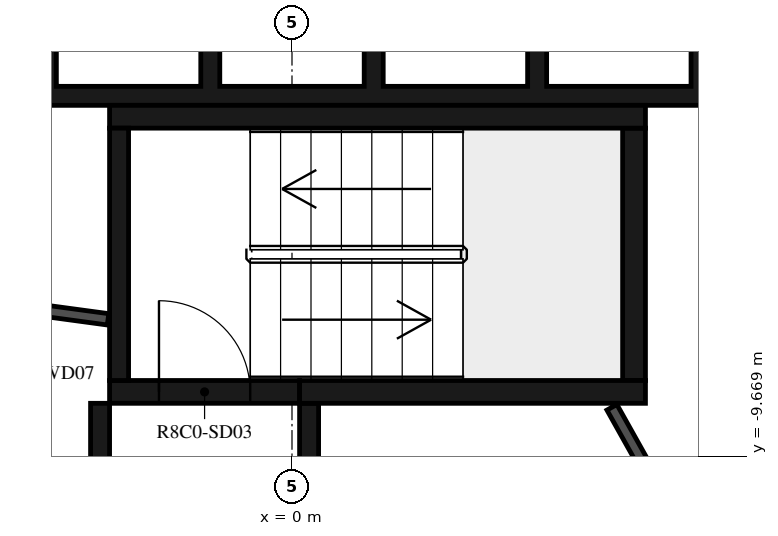
"""IFC4 building model, lengths in metres.
Left out: names, types, materials, properties, quantities, classifications, styles, units other than length and angle.
Written with IfcOpenShell. Run it as: python <this file> out.ifc"""

import sys

from ifc_helpers import new_model, si_unit, direction, frame, frame_2d, origin, place, context, subcontext, project, spatial, polyline, rectangle, outline, extrude, element, fill, save


model = new_model("IFC4")
c1 = context("Model", 3, precision=1e-05, world=origin(), true_north=direction((0.0, 1.0)))
c2 = subcontext(c1, "Body", "Model", "MODEL_VIEW")
j1 = project(units=[si_unit("LENGTHUNIT", "METRE"), si_unit("PLANEANGLEUNIT", "RADIAN")], contexts=[c1])
p1 = place(None, origin())
s1 = spatial("IfcSite", under=j1, at=p1, CompositionType="ELEMENT")
p2 = place(p1, origin())
s2 = spatial("IfcBuilding", under=s1, at=p2, CompositionType="ELEMENT")
p3 = place(p2, frame((0.0, 0.0, 319.2)))
s3 = spatial("IfcBuildingStorey", under=s2, at=p3, CompositionType="ELEMENT", Elevation=319.2)
p4 = place(p3, frame((4.51, -10.845, 0.0), z_axis=(0.0, 0.0, 1.0), x_axis=(0.865975092491, 0.500087131594, 0.0)))
e1 = element("IfcWall", 1, at=p4, inside=s3, PredefinedType="SHEAR", context=c2, shape_type="SweptSolid", body=[
    extrude(rectangle(XDim=3.033, YDim=0.5, at=frame_2d((1.516, 0.0))), origin(), (0.0, 0.0, 1.0), 3.12),
])
p5 = place(p3, frame((-2.275, -8.67, 0.0), z_axis=(0.0, 0.0, 1.0), x_axis=(0.0, 1.0, 0.0)))
e2 = element("IfcWall", 2, at=p5, inside=s3, PredefinedType="SHEAR", context=c2, shape_type="SweptSolid", body=[
    extrude(rectangle(XDim=3.32, YDim=0.25, at=frame_2d((1.66, 0.0))), origin(), (0.0, 0.0, 1.0), 3.12),
])
p6 = place(p3, frame((-2.4, -5.2, 0.0), z_axis=(0.0, 0.0, 1.0), x_axis=(1.0, 0.0, 0.0)))
e3 = element("IfcWall", 3, at=p6, inside=s3, PredefinedType="SHEAR", context=c2, shape_type="SweptSolid", body=[
    extrude(rectangle(XDim=7.05, YDim=0.3, at=frame_2d((3.525, 0.0))), origin(), (0.0, 0.0, 1.0), 3.12),
])
p7 = place(p3, frame((4.5, -8.67, 0.0), z_axis=(0.0, 0.0, 1.0), x_axis=(0.0, 1.0, 0.0)))
e4 = element("IfcWall", 4, at=p7, inside=s3, PredefinedType="SHEAR", context=c2, shape_type="SweptSolid", body=[
    extrude(rectangle(XDim=3.32, YDim=0.3, at=frame_2d((1.66, 0.0))), origin(), (0.0, 0.0, 1.0), 3.12),
])
p8 = place(p3, frame((0.1, -8.82, 0.0), z_axis=(0.0, 0.0, 1.0), x_axis=(1.0, 0.0, 0.0)))
e5 = element("IfcWall", 5, at=p8, inside=s3, PredefinedType="SHEAR", context=c2, shape_type="SweptSolid", body=[
    extrude(rectangle(XDim=4.55, YDim=0.3, at=frame_2d((2.275, 0.0))), origin(), (0.0, 0.0, 1.0), 3.12),
])
p9 = place(p3, frame((-2.4, -8.82, 0.0), z_axis=(0.0, 0.0, 1.0), x_axis=(1.0, 0.0, 0.0)))
e6 = element("IfcWall", 6, at=p9, inside=s3, PredefinedType="SHEAR", context=c2, shape_type="SweptSolid", body=[
    extrude(rectangle(XDim=2.5, YDim=0.3, at=frame_2d((1.25, 0.0))), origin(), (0.0, 0.0, 1.0), 3.12),
])
p10 = place(p9, frame((0.65, 0.0, 0.0)))
e7 = element("IfcOpeningElement", 7, at=p10, cuts=e6, PredefinedType="OPENING", context=c2, shape_type="SweptSolid", body=[
    extrude(rectangle(XDim=1.2, YDim=2.1, at=frame_2d((0.6, 1.05))), frame((0.0, 0.16, 0.0), z_axis=(0.0, -1.0, 0.0), x_axis=(1.0, 0.0, 0.0)), (0.0, 0.0, 1.0), 0.32),
])
p11 = place(p3, frame((-2.525, -8.97, 0.0), z_axis=(0.0, 0.0, 1.0), x_axis=(0.0, -1.0, 0.0)))
e8 = element("IfcWall", 8, at=p11, inside=s3, PredefinedType="SHEAR", context=c2, shape_type="SweptSolid", body=[
    extrude(rectangle(XDim=2.11, YDim=0.25, at=frame_2d((1.055, 0.0))), origin(), (0.0, 0.0, 1.0), 3.12),
])
p12 = place(p3, frame((0.225, -8.97, 0.0), z_axis=(0.0, 0.0, 1.0), x_axis=(0.0, -1.0, 0.0)))
e9 = element("IfcWall", 9, at=p12, inside=s3, PredefinedType="SHEAR", context=c2, shape_type="SweptSolid", body=[
    extrude(rectangle(XDim=2.41, YDim=0.25, at=frame_2d((1.205, 0.0))), origin(), (0.0, 0.0, 1.0), 3.12),
])
p13 = place(p3, origin())
e10 = element("IfcWall", 10, at=p13, inside=s3, PredefinedType="SHEAR", context=c2, shape_type="SweptSolid", body=[
    extrude(outline(polyline([(9.8, -5.05), (9.8, -4.8), (9.8, -1.9), (9.55, -1.9), (9.55, -4.8), (7.65, -4.8), (7.65, -1.9), (7.4, -1.9), (7.4, -4.8), (5.5, -4.8), (5.5, -1.9), (5.25, -1.9), (5.25, -4.8), (3.35, -4.8), (3.35, -1.9), (3.1, -1.9), (3.1, -4.8), (1.2, -4.8), (1.2, -1.9), (0.95, -1.9), (0.95, -4.8), (-0.95, -4.8), (-0.95, -1.9), (-1.2, -1.9), (-1.2, -4.8), (-3.1, -4.8), (-3.1, -1.9), (-3.35, -1.9), (-3.35, -4.8), (-5.25, -4.8), (-5.25, -1.9), (-5.5, -1.9), (-5.5, -4.8), (-9.55, -4.8), (-9.55, -1.9), (-9.8, -1.9), (-9.8, -4.8), (-9.8, -5.05), (9.8, -5.05)])), origin(), (0.0, 0.0, 1.0), 3.12),
])
p14 = place(p3, frame((4.922, -10.296, 0.0), z_axis=(0.0, 0.0, 1.0), x_axis=(-0.48860846254, 0.872503163509, 0.0)))
e11 = element("IfcWall", 11, at=p14, inside=s3, PredefinedType="PARTITIONING", context=c2, shape_type="SweptSolid", body=[
    extrude(rectangle(XDim=1.459, YDim=0.15, at=frame_2d((0.73, 0.0))), origin(), (0.0, 0.0, 1.0), 3.12),
])
p15 = place(p3, frame((-2.42, -7.865, 0.0), z_axis=(0.0, 0.0, 1.0), x_axis=(-0.990972299108, 0.134066783362, 0.0)))
e12 = element("IfcWall", 12, at=p15, inside=s3, PredefinedType="PARTITIONING", context=c2, shape_type="SweptSolid", body=[
    extrude(rectangle(XDim=2.176, YDim=0.15, at=frame_2d((1.088, 0.0))), origin(), (0.0, 0.0, 1.0), 3.12),
])
p16 = place(p10, origin())
e13 = element("IfcDoor", 13, at=p16, inside=s3, OperationType="SINGLE_SWING_LEFT", PredefinedType="DOOR", context=c2, shape_type="SweptSolid", body=[
    extrude(rectangle(XDim=1.2, YDim=2.1, at=frame_2d((0.6, 1.05))), frame((0.0, 0.025, 0.0), z_axis=(0.0, -1.0, 0.0), x_axis=(1.0, 0.0, 0.0)), (0.0, 0.0, 1.0), 0.05),
])
fill(e7, e13)
save(model, sys.argv[1])
